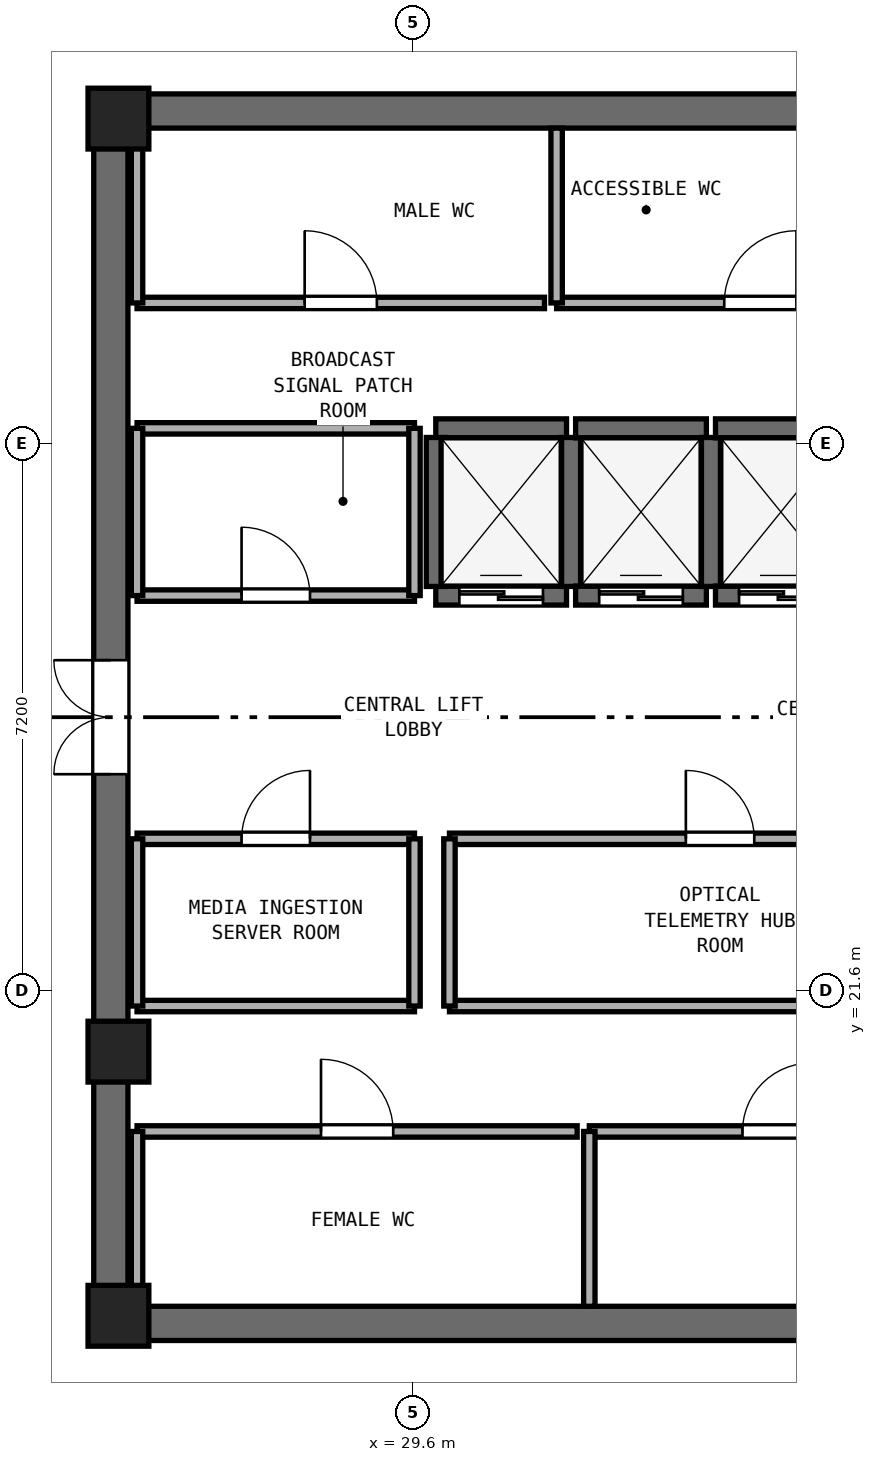
"""IFC4 building model, lengths in metres.
Left out: names, types, materials, properties, quantities, classifications, styles, units other than length and angle.
Written with IfcOpenShell. Run it as: python <this file> out.ifc"""

import sys

from ifc_helpers import new_model, si_unit, direction, frame, frame_2d, origin, origin_2d, place, context, subcontext, project, spatial, rectangle, extrude, element, fill, save


model = new_model("IFC4")
c1 = context("Model", 3, precision=1e-05, world=origin(), true_north=direction((0.0, 1.0)))
c2 = subcontext(c1, "Body", "Model", "MODEL_VIEW")
j1 = project(units=[si_unit("LENGTHUNIT", "METRE"), si_unit("PLANEANGLEUNIT", "RADIAN")], contexts=[c1])
p1 = place(None, origin())
s1 = spatial("IfcSite", under=j1, at=p1, CompositionType="ELEMENT")
p2 = place(p1, origin())
s2 = spatial("IfcBuilding", under=s1, at=p2, CompositionType="ELEMENT")
p3 = place(p2, frame((0.0, 0.0, 304.8)))
s3 = spatial("IfcBuildingStorey", under=s2, at=p3, CompositionType="ELEMENT", Elevation=304.8)
for number, where, z_axis, x_axis in (
    (1, (25.4, 17.225, 0.0), (0.0, 0.0, 1.0), (1.0, 0.0, 0.0)),
    (2, (25.4, 33.175, 0.0), (0.0, 0.0, 1.0), (1.0, 0.0, 0.0)),
):
    element("IfcWall", number, at=place(p3, frame(where, z_axis=z_axis, x_axis=x_axis)), inside=s3, PredefinedType="SHEAR", context=c2, shape_type="SweptSolid", body=[
        extrude(rectangle(XDim=23.2, YDim=0.45, at=frame_2d((11.6, 0.0))), origin(), (0.0, 0.0, 1.0), 3.4),
    ])
p4 = place(p3, frame((25.625, 17.45, 0.0), z_axis=(0.0, 0.0, 1.0), x_axis=(0.0, 1.0, 0.0)))
e3 = element("IfcWall", 3, at=p4, inside=s3, PredefinedType="SHEAR", context=c2, shape_type="SweptSolid", body=[
    extrude(rectangle(XDim=15.5, YDim=0.45, at=frame_2d((7.75, 0.0))), origin(), (0.0, 0.0, 1.0), 3.4),
])
p5 = place(p4, frame((7.0, 0.0, 0.0)))
e4 = element("IfcOpeningElement", 4, at=p5, cuts=e3, PredefinedType="OPENING", context=c2, shape_type="SweptSolid", body=[
    extrude(rectangle(XDim=1.5, YDim=2.15, at=frame_2d((0.75, 1.075))), frame((0.0, 0.235, 0.0), z_axis=(0.0, -1.0, 0.0), x_axis=(1.0, 0.0, 0.0)), (0.0, 0.0, 1.0), 0.47),
])
for number, where, z_axis, x_axis in (
    (5, (25.725, 17.325, 0.0), (0.0, 0.0, 1.0), (1.0, 0.0, 0.0)),
    (6, (25.725, 33.075, 0.0), (0.0, 0.0, 1.0), (1.0, 0.0, 0.0)),
    (7, (25.725, 20.8, 0.0), (0.0, 0.0, 1.0), (1.0, 0.0, 0.0)),
):
    element("IfcColumn", number, at=place(p3, frame(where, z_axis=z_axis, x_axis=x_axis)), inside=s3, PredefinedType="PILASTER", context=c2, shape_type="SweptSolid", body=[
        extrude(rectangle(XDim=0.8, YDim=0.8, at=origin_2d()), origin(), (0.0, 0.0, 1.0), 3.8),
    ])
p6 = place(p3, frame((29.9, 26.8, 0.0), z_axis=(0.0, 0.0, 1.0), x_axis=(1.0, 0.0, 0.0)))
e8 = element("IfcWall", 8, at=p6, inside=s3, PredefinedType="SHEAR", context=c2, shape_type="SweptSolid", body=[
    extrude(rectangle(XDim=1.72, YDim=0.25, at=frame_2d((0.86, 0.0))), origin(), (0.0, 0.0, 1.0), 3.4),
])
p7 = place(p6, frame((0.31, 0.0, 0.0)))
e9 = element("IfcOpeningElement", 9, at=p7, cuts=e8, PredefinedType="OPENING", context=c2, shape_type="SweptSolid", body=[
    extrude(rectangle(XDim=1.1, YDim=2.15, at=frame_2d((0.55, 1.075))), frame((0.0, 0.135, 0.0), z_axis=(0.0, -1.0, 0.0), x_axis=(1.0, 0.0, 0.0)), (0.0, 0.0, 1.0), 0.27),
])
p8 = place(p3, frame((29.9, 29.0, 0.0), z_axis=(0.0, 0.0, 1.0), x_axis=(1.0, 0.0, 0.0)))
e10 = element("IfcWall", 10, at=p8, inside=s3, PredefinedType="SHEAR", context=c2, shape_type="SweptSolid", body=[
    extrude(rectangle(XDim=1.72, YDim=0.25, at=frame_2d((0.86, 0.0))), origin(), (0.0, 0.0, 1.0), 3.4),
])
for number, where, z_axis, x_axis in (
    (11, (29.9, 26.92, 0.0), (0.0, 0.0, 1.0), (0.0, 1.0, 0.0)),
    (12, (31.68, 26.92, 0.0), (0.0, 0.0, 1.0), (0.0, 1.0, 0.0)),
):
    element("IfcWall", number, at=place(p3, frame(where, z_axis=z_axis, x_axis=x_axis)), inside=s3, PredefinedType="SHEAR", context=c2, shape_type="SweptSolid", body=[
        extrude(rectangle(XDim=1.96, YDim=0.25, at=frame_2d((0.98, 0.0))), origin(), (0.0, 0.0, 1.0), 3.4),
    ])
p9 = place(p3, frame((31.74, 26.8, 0.0), z_axis=(0.0, 0.0, 1.0), x_axis=(1.0, 0.0, 0.0)))
e13 = element("IfcWall", 13, at=p9, inside=s3, PredefinedType="SHEAR", context=c2, shape_type="SweptSolid", body=[
    extrude(rectangle(XDim=1.72, YDim=0.25, at=frame_2d((0.86, 0.0))), origin(), (0.0, 0.0, 1.0), 3.4),
])
p10 = place(p9, frame((0.31, 0.0, 0.0)))
e14 = element("IfcOpeningElement", 14, at=p10, cuts=e13, PredefinedType="OPENING", context=c2, shape_type="SweptSolid", body=[
    extrude(rectangle(XDim=1.1, YDim=2.15, at=frame_2d((0.55, 1.075))), frame((0.0, 0.135, 0.0), z_axis=(0.0, -1.0, 0.0), x_axis=(1.0, 0.0, 0.0)), (0.0, 0.0, 1.0), 0.27),
])
p11 = place(p3, frame((31.74, 29.0, 0.0), z_axis=(0.0, 0.0, 1.0), x_axis=(1.0, 0.0, 0.0)))
e15 = element("IfcWall", 15, at=p11, inside=s3, PredefinedType="SHEAR", context=c2, shape_type="SweptSolid", body=[
    extrude(rectangle(XDim=1.72, YDim=0.25, at=frame_2d((0.86, 0.0))), origin(), (0.0, 0.0, 1.0), 3.4),
])
p12 = place(p3, frame((33.52, 26.92, 0.0), z_axis=(0.0, 0.0, 1.0), x_axis=(0.0, 1.0, 0.0)))
e16 = element("IfcWall", 16, at=p12, inside=s3, PredefinedType="SHEAR", context=c2, shape_type="SweptSolid", body=[
    extrude(rectangle(XDim=1.96, YDim=0.25, at=frame_2d((0.98, 0.0))), origin(), (0.0, 0.0, 1.0), 3.4),
])
p13 = place(p3, frame((33.58, 26.8, 0.0), z_axis=(0.0, 0.0, 1.0), x_axis=(1.0, 0.0, 0.0)))
e17 = element("IfcWall", 17, at=p13, inside=s3, PredefinedType="SHEAR", context=c2, shape_type="SweptSolid", body=[
    extrude(rectangle(XDim=1.72, YDim=0.25, at=frame_2d((0.86, 0.0))), origin(), (0.0, 0.0, 1.0), 3.4),
])
p14 = place(p13, frame((0.31, 0.0, 0.0)))
e18 = element("IfcOpeningElement", 18, at=p14, cuts=e17, PredefinedType="OPENING", context=c2, shape_type="SweptSolid", body=[
    extrude(rectangle(XDim=1.1, YDim=2.15, at=frame_2d((0.55, 1.075))), frame((0.0, 0.135, 0.0), z_axis=(0.0, -1.0, 0.0), x_axis=(1.0, 0.0, 0.0)), (0.0, 0.0, 1.0), 0.27),
])
p15 = place(p3, frame((33.58, 29.0, 0.0), z_axis=(0.0, 0.0, 1.0), x_axis=(1.0, 0.0, 0.0)))
e19 = element("IfcWall", 19, at=p15, inside=s3, PredefinedType="SHEAR", context=c2, shape_type="SweptSolid", body=[
    extrude(rectangle(XDim=1.72, YDim=0.25, at=frame_2d((0.86, 0.0))), origin(), (0.0, 0.0, 1.0), 3.4),
])
p16 = place(p3, frame((25.97, 30.65, 0.0), z_axis=(0.0, 0.0, 1.0), x_axis=(1.0, 0.0, 0.0)))
e20 = element("IfcWall", 20, at=p16, inside=s3, PredefinedType="PARTITIONING", context=c2, shape_type="SweptSolid", body=[
    extrude(rectangle(XDim=5.36, YDim=0.15, at=frame_2d((2.68, 0.0))), origin(), (0.0, 0.0, 1.0), 3.4),
])
p17 = place(p16, frame((2.205, 0.0, 0.0)))
e21 = element("IfcOpeningElement", 21, at=p17, cuts=e20, PredefinedType="OPENING", context=c2, shape_type="SweptSolid", body=[
    extrude(rectangle(XDim=0.95, YDim=2.1, at=frame_2d((0.475, 1.05))), frame((0.0, 0.085, 0.0), z_axis=(0.0, -1.0, 0.0), x_axis=(1.0, 0.0, 0.0)), (0.0, 0.0, 1.0), 0.17),
])
p18 = place(p3, frame((25.97, 30.65, 0.0), z_axis=(0.0, 0.0, 1.0), x_axis=(0.0, 1.0, 0.0)))
e22 = element("IfcWall", 22, at=p18, inside=s3, PredefinedType="PARTITIONING", context=c2, shape_type="SweptSolid", body=[
    extrude(rectangle(XDim=2.3, YDim=0.15, at=frame_2d((1.15, 0.0))), origin(), (0.0, 0.0, 1.0), 2.5),
])
p19 = place(p3, frame((31.49, 30.65, 0.0), z_axis=(0.0, 0.0, 1.0), x_axis=(1.0, 0.0, 0.0)))
e23 = element("IfcWall", 23, at=p19, inside=s3, PredefinedType="PARTITIONING", context=c2, shape_type="SweptSolid", body=[
    extrude(rectangle(XDim=5.36, YDim=0.15, at=frame_2d((2.68, 0.0))), origin(), (0.0, 0.0, 1.0), 3.4),
])
p20 = place(p19, frame((2.205, 0.0, 0.0)))
e24 = element("IfcOpeningElement", 24, at=p20, cuts=e23, PredefinedType="OPENING", context=c2, shape_type="SweptSolid", body=[
    extrude(rectangle(XDim=0.95, YDim=2.1, at=frame_2d((0.475, 1.05))), frame((0.0, 0.085, 0.0), z_axis=(0.0, -1.0, 0.0), x_axis=(1.0, 0.0, 0.0)), (0.0, 0.0, 1.0), 0.17),
])
p21 = place(p3, frame((31.49, 30.65, 0.0), z_axis=(0.0, 0.0, 1.0), x_axis=(0.0, 1.0, 0.0)))
e25 = element("IfcWall", 25, at=p21, inside=s3, PredefinedType="PARTITIONING", context=c2, shape_type="SweptSolid", body=[
    extrude(rectangle(XDim=2.3, YDim=0.15, at=frame_2d((1.15, 0.0))), origin(), (0.0, 0.0, 1.0), 3.4),
])
p22 = place(p3, frame((25.97, 19.75, 0.0), z_axis=(0.0, 0.0, 1.0), x_axis=(1.0, 0.0, 0.0)))
e26 = element("IfcWall", 26, at=p22, inside=s3, PredefinedType="PARTITIONING", context=c2, shape_type="SweptSolid", body=[
    extrude(rectangle(XDim=5.79, YDim=0.15, at=frame_2d((2.895, 0.0))), origin(), (0.0, 0.0, 1.0), 3.4),
])
p23 = place(p22, frame((2.42, 0.0, 0.0)))
e27 = element("IfcOpeningElement", 27, at=p23, cuts=e26, PredefinedType="OPENING", context=c2, shape_type="SweptSolid", body=[
    extrude(rectangle(XDim=0.95, YDim=2.1, at=frame_2d((0.475, 1.05))), frame((0.0, 0.085, 0.0), z_axis=(0.0, -1.0, 0.0), x_axis=(1.0, 0.0, 0.0)), (0.0, 0.0, 1.0), 0.17),
])
p24 = place(p3, frame((25.97, 17.45, 0.0), z_axis=(0.0, 0.0, 1.0), x_axis=(0.0, 1.0, 0.0)))
e28 = element("IfcWall", 28, at=p24, inside=s3, PredefinedType="PARTITIONING", context=c2, shape_type="SweptSolid", body=[
    extrude(rectangle(XDim=2.3, YDim=0.15, at=frame_2d((1.15, 0.0))), origin(), (0.0, 0.0, 1.0), 2.5),
])
p25 = place(p3, frame((31.92, 19.75, 0.0), z_axis=(0.0, 0.0, 1.0), x_axis=(1.0, 0.0, 0.0)))
e29 = element("IfcWall", 29, at=p25, inside=s3, PredefinedType="PARTITIONING", context=c2, shape_type="SweptSolid", body=[
    extrude(rectangle(XDim=4.93, YDim=0.15, at=frame_2d((2.465, 0.0))), origin(), (0.0, 0.0, 1.0), 3.4),
])
p26 = place(p25, frame((2.015, 0.0, 0.0)))
e30 = element("IfcOpeningElement", 30, at=p26, cuts=e29, PredefinedType="OPENING", context=c2, shape_type="SweptSolid", body=[
    extrude(rectangle(XDim=0.9, YDim=2.1, at=frame_2d((0.45, 1.05))), frame((0.0, 0.085, 0.0), z_axis=(0.0, -1.0, 0.0), x_axis=(1.0, 0.0, 0.0)), (0.0, 0.0, 1.0), 0.17),
])
p27 = place(p3, frame((31.92, 17.45, 0.0), z_axis=(0.0, 0.0, 1.0), x_axis=(0.0, 1.0, 0.0)))
e31 = element("IfcWall", 31, at=p27, inside=s3, PredefinedType="PARTITIONING", context=c2, shape_type="SweptSolid", body=[
    extrude(rectangle(XDim=2.3, YDim=0.15, at=frame_2d((1.15, 0.0))), origin(), (0.0, 0.0, 1.0), 3.4),
])
p28 = place(p3, frame((25.97, 26.8, 0.0), z_axis=(0.0, 0.0, 1.0), x_axis=(1.0, 0.0, 0.0)))
e32 = element("IfcWall", 32, at=p28, inside=s3, PredefinedType="PARTITIONING", context=c2, shape_type="SweptSolid", body=[
    extrude(rectangle(XDim=3.65, YDim=0.15, at=frame_2d((1.825, 0.0))), origin(), (0.0, 0.0, 1.0), 3.4),
])
p29 = place(p28, frame((1.375, 0.0, 0.0)))
e33 = element("IfcOpeningElement", 33, at=p29, cuts=e32, PredefinedType="OPENING", context=c2, shape_type="SweptSolid", body=[
    extrude(rectangle(XDim=0.9, YDim=2.1, at=frame_2d((0.45, 1.05))), frame((0.0, 0.085, 0.0), z_axis=(0.0, -1.0, 0.0), x_axis=(1.0, 0.0, 0.0)), (0.0, 0.0, 1.0), 0.17),
])
p30 = place(p3, frame((25.97, 29.0, 0.0), z_axis=(0.0, 0.0, 1.0), x_axis=(1.0, 0.0, 0.0)))
e34 = element("IfcWall", 34, at=p30, inside=s3, PredefinedType="PARTITIONING", context=c2, shape_type="SweptSolid", body=[
    extrude(rectangle(XDim=3.65, YDim=0.15, at=frame_2d((1.825, 0.0))), origin(), (0.0, 0.0, 1.0), 3.4),
])
p31 = place(p3, frame((25.97, 26.8, 0.0), z_axis=(0.0, 0.0, 1.0), x_axis=(0.0, 1.0, 0.0)))
e35 = element("IfcWall", 35, at=p31, inside=s3, PredefinedType="PARTITIONING", context=c2, shape_type="SweptSolid", body=[
    extrude(rectangle(XDim=2.2, YDim=0.15, at=frame_2d((1.1, 0.0))), origin(), (0.0, 0.0, 1.0), 2.5),
])
p32 = place(p3, frame((29.62, 26.8, 0.0), z_axis=(0.0, 0.0, 1.0), x_axis=(0.0, 1.0, 0.0)))
e36 = element("IfcWall", 36, at=p32, inside=s3, PredefinedType="PARTITIONING", context=c2, shape_type="SweptSolid", body=[
    extrude(rectangle(XDim=2.2, YDim=0.15, at=frame_2d((1.1, 0.0))), origin(), (0.0, 0.0, 1.0), 3.4),
])
p33 = place(p3, frame((25.97, 21.4, 0.0), z_axis=(0.0, 0.0, 1.0), x_axis=(1.0, 0.0, 0.0)))
e37 = element("IfcWall", 37, at=p33, inside=s3, PredefinedType="PARTITIONING", context=c2, shape_type="SweptSolid", body=[
    extrude(rectangle(XDim=3.65, YDim=0.15, at=frame_2d((1.825, 0.0))), origin(), (0.0, 0.0, 1.0), 3.4),
])
p34 = place(p3, frame((25.97, 23.6, 0.0), z_axis=(0.0, 0.0, 1.0), x_axis=(1.0, 0.0, 0.0)))
e38 = element("IfcWall", 38, at=p34, inside=s3, PredefinedType="PARTITIONING", context=c2, shape_type="SweptSolid", body=[
    extrude(rectangle(XDim=3.65, YDim=0.15, at=frame_2d((1.825, 0.0))), origin(), (0.0, 0.0, 1.0), 3.4),
])
p35 = place(p34, frame((1.375, 0.0, 0.0)))
e39 = element("IfcOpeningElement", 39, at=p35, cuts=e38, PredefinedType="OPENING", context=c2, shape_type="SweptSolid", body=[
    extrude(rectangle(XDim=0.9, YDim=2.1, at=frame_2d((0.45, 1.05))), frame((0.0, 0.085, 0.0), z_axis=(0.0, -1.0, 0.0), x_axis=(1.0, 0.0, 0.0)), (0.0, 0.0, 1.0), 0.17),
])
p36 = place(p3, frame((25.97, 21.4, 0.0), z_axis=(0.0, 0.0, 1.0), x_axis=(0.0, 1.0, 0.0)))
e40 = element("IfcWall", 40, at=p36, inside=s3, PredefinedType="PARTITIONING", context=c2, shape_type="SweptSolid", body=[
    extrude(rectangle(XDim=2.2, YDim=0.15, at=frame_2d((1.1, 0.0))), origin(), (0.0, 0.0, 1.0), 2.5),
])
p37 = place(p3, frame((29.62, 21.4, 0.0), z_axis=(0.0, 0.0, 1.0), x_axis=(0.0, 1.0, 0.0)))
e41 = element("IfcWall", 41, at=p37, inside=s3, PredefinedType="PARTITIONING", context=c2, shape_type="SweptSolid", body=[
    extrude(rectangle(XDim=2.2, YDim=0.15, at=frame_2d((1.1, 0.0))), origin(), (0.0, 0.0, 1.0), 3.4),
])
p38 = place(p3, frame((30.08, 21.4, 0.0), z_axis=(0.0, 0.0, 1.0), x_axis=(1.0, 0.0, 0.0)))
e42 = element("IfcWall", 42, at=p38, inside=s3, PredefinedType="PARTITIONING", context=c2, shape_type="SweptSolid", body=[
    extrude(rectangle(XDim=7.12, YDim=0.15, at=frame_2d((3.56, 0.0))), origin(), (0.0, 0.0, 1.0), 3.4),
])
p39 = place(p3, frame((30.08, 23.6, 0.0), z_axis=(0.0, 0.0, 1.0), x_axis=(1.0, 0.0, 0.0)))
e43 = element("IfcWall", 43, at=p39, inside=s3, PredefinedType="PARTITIONING", context=c2, shape_type="SweptSolid", body=[
    extrude(rectangle(XDim=7.12, YDim=0.15, at=frame_2d((3.56, 0.0))), origin(), (0.0, 0.0, 1.0), 3.4),
])
p40 = place(p39, frame((3.11, 0.0, 0.0)))
e44 = element("IfcOpeningElement", 44, at=p40, cuts=e43, PredefinedType="OPENING", context=c2, shape_type="SweptSolid", body=[
    extrude(rectangle(XDim=0.9, YDim=2.1, at=frame_2d((0.45, 1.05))), frame((0.0, 0.085, 0.0), z_axis=(0.0, -1.0, 0.0), x_axis=(1.0, 0.0, 0.0)), (0.0, 0.0, 1.0), 0.17),
])
p41 = place(p3, frame((30.08, 21.4, 0.0), z_axis=(0.0, 0.0, 1.0), x_axis=(0.0, 1.0, 0.0)))
e45 = element("IfcWall", 45, at=p41, inside=s3, PredefinedType="PARTITIONING", context=c2, shape_type="SweptSolid", body=[
    extrude(rectangle(XDim=2.2, YDim=0.15, at=frame_2d((1.1, 0.0))), origin(), (0.0, 0.0, 1.0), 3.4),
])
p42 = place(p7, origin())
e46 = element("IfcDoor", 46, at=p42, inside=s3, OperationType="DOUBLE_DOOR_SLIDING", PredefinedType="DOOR", context=c2, shape_type="SweptSolid", body=[
    extrude(rectangle(XDim=1.1, YDim=2.15, at=frame_2d((0.55, 1.075))), frame((0.0, 0.025, 0.0), z_axis=(0.0, -1.0, 0.0), x_axis=(1.0, 0.0, 0.0)), (0.0, 0.0, 1.0), 0.05),
])
fill(e9, e46)
p43 = place(p10, origin())
e47 = element("IfcDoor", 47, at=p43, inside=s3, OperationType="DOUBLE_DOOR_SLIDING", PredefinedType="DOOR", context=c2, shape_type="SweptSolid", body=[
    extrude(rectangle(XDim=1.1, YDim=2.15, at=frame_2d((0.55, 1.075))), frame((0.0, 0.025, 0.0), z_axis=(0.0, -1.0, 0.0), x_axis=(1.0, 0.0, 0.0)), (0.0, 0.0, 1.0), 0.05),
])
fill(e14, e47)
p44 = place(p14, origin())
e48 = element("IfcDoor", 48, at=p44, inside=s3, OperationType="DOUBLE_DOOR_SLIDING", PredefinedType="DOOR", context=c2, shape_type="SweptSolid", body=[
    extrude(rectangle(XDim=1.1, YDim=2.15, at=frame_2d((0.55, 1.075))), frame((0.0, 0.025, 0.0), z_axis=(0.0, -1.0, 0.0), x_axis=(1.0, 0.0, 0.0)), (0.0, 0.0, 1.0), 0.05),
])
fill(e18, e48)
p45 = place(p5, origin())
e49 = element("IfcDoor", 49, at=p45, inside=s3, OperationType="DOUBLE_DOOR_SINGLE_SWING", PredefinedType="DOOR", context=c2, shape_type="SweptSolid", body=[
    extrude(rectangle(XDim=1.5, YDim=2.15, at=frame_2d((0.75, 1.075))), frame((0.0, 0.025, 0.0), z_axis=(0.0, -1.0, 0.0), x_axis=(1.0, 0.0, 0.0)), (0.0, 0.0, 1.0), 0.05),
])
fill(e4, e49)
p46 = place(p17, origin())
e50 = element("IfcDoor", 50, at=p46, inside=s3, OperationType="SINGLE_SWING_LEFT", PredefinedType="DOOR", context=c2, shape_type="SweptSolid", body=[
    extrude(rectangle(XDim=0.95, YDim=2.1, at=frame_2d((0.475, 1.05))), frame((0.0, 0.025, 0.0), z_axis=(0.0, -1.0, 0.0), x_axis=(1.0, 0.0, 0.0)), (0.0, 0.0, 1.0), 0.05),
])
fill(e21, e50)
p47 = place(p20, origin())
e51 = element("IfcDoor", 51, at=p47, inside=s3, OperationType="SINGLE_SWING_RIGHT", PredefinedType="DOOR", context=c2, shape_type="SweptSolid", body=[
    extrude(rectangle(XDim=0.95, YDim=2.1, at=frame_2d((0.475, 1.05))), frame((0.0, 0.025, 0.0), z_axis=(0.0, -1.0, 0.0), x_axis=(1.0, 0.0, 0.0)), (0.0, 0.0, 1.0), 0.05),
])
fill(e24, e51)
p48 = place(p23, origin())
e52 = element("IfcDoor", 52, at=p48, inside=s3, OperationType="SINGLE_SWING_LEFT", PredefinedType="DOOR", context=c2, shape_type="SweptSolid", body=[
    extrude(rectangle(XDim=0.95, YDim=2.1, at=frame_2d((0.475, 1.05))), frame((0.0, 0.025, 0.0), z_axis=(0.0, -1.0, 0.0), x_axis=(1.0, 0.0, 0.0)), (0.0, 0.0, 1.0), 0.05),
])
fill(e27, e52)
p49 = place(p26, origin())
e53 = element("IfcDoor", 53, at=p49, inside=s3, OperationType="SINGLE_SWING_RIGHT", PredefinedType="DOOR", context=c2, shape_type="SweptSolid", body=[
    extrude(rectangle(XDim=0.9, YDim=2.1, at=frame_2d((0.45, 1.05))), frame((0.0, 0.025, 0.0), z_axis=(0.0, -1.0, 0.0), x_axis=(1.0, 0.0, 0.0)), (0.0, 0.0, 1.0), 0.05),
])
fill(e30, e53)
p50 = place(p29, origin())
e54 = element("IfcDoor", 54, at=p50, inside=s3, OperationType="SINGLE_SWING_LEFT", PredefinedType="DOOR", context=c2, shape_type="SweptSolid", body=[
    extrude(rectangle(XDim=0.9, YDim=2.1, at=frame_2d((0.45, 1.05))), frame((0.0, 0.025, 0.0), z_axis=(0.0, -1.0, 0.0), x_axis=(1.0, 0.0, 0.0)), (0.0, 0.0, 1.0), 0.05),
])
fill(e33, e54)
p51 = place(p35, origin())
e55 = element("IfcDoor", 55, at=p51, inside=s3, OperationType="SINGLE_SWING_RIGHT", PredefinedType="DOOR", context=c2, shape_type="SweptSolid", body=[
    extrude(rectangle(XDim=0.9, YDim=2.1, at=frame_2d((0.45, 1.05))), frame((0.0, 0.025, 0.0), z_axis=(0.0, -1.0, 0.0), x_axis=(1.0, 0.0, 0.0)), (0.0, 0.0, 1.0), 0.05),
])
fill(e39, e55)
p52 = place(p40, origin())
e56 = element("IfcDoor", 56, at=p52, inside=s3, OperationType="SINGLE_SWING_LEFT", PredefinedType="DOOR", context=c2, shape_type="SweptSolid", body=[
    extrude(rectangle(XDim=0.9, YDim=2.1, at=frame_2d((0.45, 1.05))), frame((0.0, 0.025, 0.0), z_axis=(0.0, -1.0, 0.0), x_axis=(1.0, 0.0, 0.0)), (0.0, 0.0, 1.0), 0.05),
])
fill(e44, e56)
save(model, sys.argv[1])
